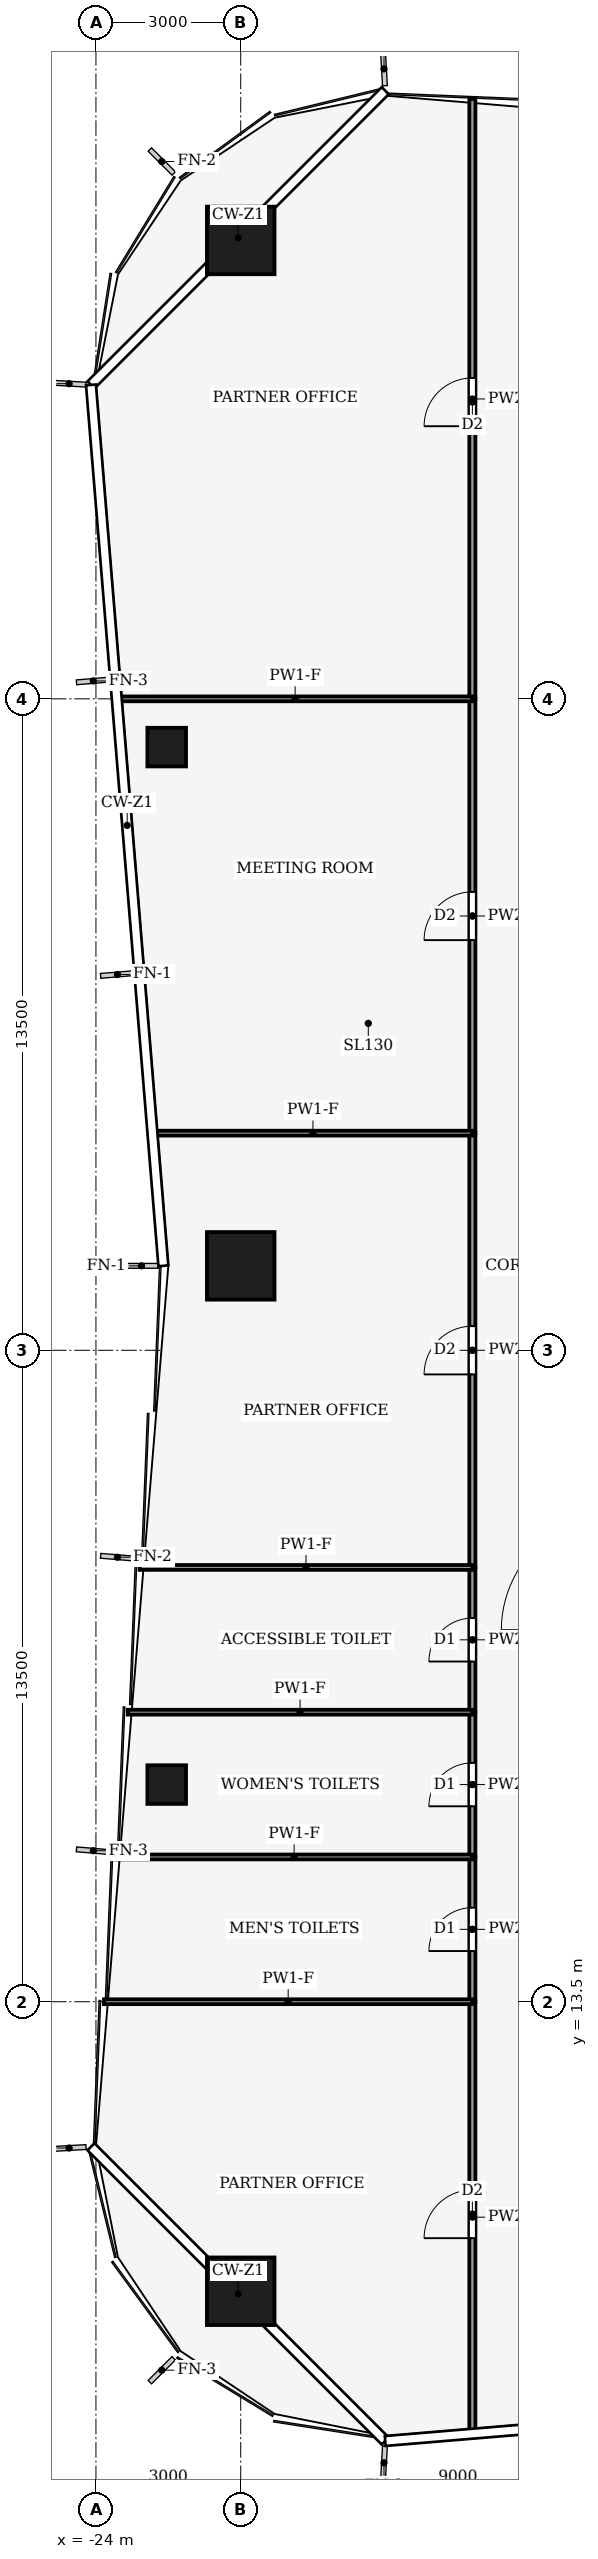
"""IFC4 building model, lengths in metres.
Left out: names, types, materials, properties, quantities, classifications, styles, units other than length and angle.
Written with IfcOpenShell. Run it as: python <this file> out.ifc"""

import sys

from ifc_helpers import new_model, si_unit, direction, frame, frame_2d, origin, origin_2d, place, context, subcontext, project, spatial, rectangle, hollow_rectangle, extrude, element, fill, save


model = new_model("IFC4")
c1 = context("Model", 3, precision=1e-05, world=origin(), true_north=direction((0.0, 1.0)))
c2 = subcontext(c1, "Body", "Model", "MODEL_VIEW")
j1 = project(units=[si_unit("LENGTHUNIT", "METRE"), si_unit("PLANEANGLEUNIT", "RADIAN")], contexts=[c1])
p1 = place(None, origin())
s1 = spatial("IfcSite", under=j1, at=p1, CompositionType="ELEMENT")
p2 = place(p1, origin())
s2 = spatial("IfcBuilding", under=s1, at=p2, CompositionType="ELEMENT")
p3 = place(p2, frame((0.0, 0.0, 106.0)))
s3 = spatial("IfcBuildingStorey", under=s2, at=p3, CompositionType="ELEMENT", Elevation=106.0)
for number, where, z_axis, x_axis in (
    (1, (-21.0, 50.0, 0.0), (0.0, 0.0, 1.0), (1.0, 0.0, 0.0)),
    (2, (-21.0, 7.5, 0.0), (0.0, 0.0, 1.0), (1.0, 0.0, 0.0)),
    (3, (-21.0, 28.75, 0.0), (0.0, 0.0, 1.0), (1.0, 0.0, 0.0)),
):
    element("IfcColumn", number, at=place(p3, frame(where, z_axis=z_axis, x_axis=x_axis)), inside=s3, PredefinedType="COLUMN", context=c2, shape_type="SweptSolid", body=[
        extrude(hollow_rectangle(XDim=1.4, YDim=1.4, WallThickness=0.08, at=origin_2d()), origin(), (0.0, 0.0, 1.0), 4.0),
    ])
for number, where, z_axis, x_axis in (
    (4, (-22.534, 18.0, 0.0), (0.0, 0.0, 1.0), (1.0, 0.0, 0.0)),
    (5, (-22.534, 39.5, 0.0), (0.0, 0.0, 1.0), (1.0, 0.0, 0.0)),
):
    element("IfcColumn", number, at=place(p3, frame(where, z_axis=z_axis, x_axis=x_axis)), inside=s3, PredefinedType="COLUMN", context=c2, shape_type="SweptSolid", body=[
        extrude(hollow_rectangle(XDim=0.8, YDim=0.8, WallThickness=0.04, at=origin_2d()), origin(), (0.0, 0.0, 1.0), 4.0),
    ])
p4 = place(p3, frame((-16.2, 4.57, 0.0), z_axis=(0.0, 0.0, 1.0), x_axis=(0.0, 1.0, 0.0)))
e6 = element("IfcWall", 6, at=p4, inside=s3, PredefinedType="PARTITIONING", context=c2, shape_type="SweptSolid", body=[
    extrude(rectangle(XDim=8.93, YDim=0.125, at=frame_2d((4.465, 0.0))), origin(), (0.0, 0.0, 1.0), 3.04),
])
p5 = place(p4, frame((4.03, 0.0, 0.0)))
e7 = element("IfcOpeningElement", 7, at=p5, cuts=e6, PredefinedType="OPENING", context=c2, shape_type="SweptSolid", body=[
    extrude(rectangle(XDim=1.0, YDim=2.1, at=frame_2d((0.5, 1.05))), frame((0.0, 0.073, 0.0), z_axis=(0.0, -1.0, 0.0), x_axis=(1.0, 0.0, 0.0)), (0.0, 0.0, 1.0), 0.145),
])
p6 = place(p3, frame((-16.2, 13.5, 0.0), z_axis=(0.0, 0.0, 1.0), x_axis=(0.0, 1.0, 0.0)))
e8 = element("IfcWall", 8, at=p6, inside=s3, PredefinedType="PARTITIONING", context=c2, shape_type="SweptSolid", body=[
    extrude(rectangle(XDim=3.0, YDim=0.125, at=frame_2d((1.5, 0.0))), origin(), (0.0, 0.0, 1.0), 3.87),
])
p7 = place(p6, frame((1.05, 0.0, 0.0)))
e9 = element("IfcOpeningElement", 9, at=p7, cuts=e8, PredefinedType="OPENING", context=c2, shape_type="SweptSolid", body=[
    extrude(rectangle(XDim=0.9, YDim=2.1, at=frame_2d((0.45, 1.05))), frame((0.0, 0.073, 0.0), z_axis=(0.0, -1.0, 0.0), x_axis=(1.0, 0.0, 0.0)), (0.0, 0.0, 1.0), 0.145),
])
p8 = place(p3, frame((-16.2, 16.5, 0.0), z_axis=(0.0, 0.0, 1.0), x_axis=(0.0, 1.0, 0.0)))
e10 = element("IfcWall", 10, at=p8, inside=s3, PredefinedType="PARTITIONING", context=c2, shape_type="SweptSolid", body=[
    extrude(rectangle(XDim=3.0, YDim=0.125, at=frame_2d((1.5, 0.0))), origin(), (0.0, 0.0, 1.0), 3.14),
])
p9 = place(p8, frame((1.05, 0.0, 0.0)))
e11 = element("IfcOpeningElement", 11, at=p9, cuts=e10, PredefinedType="OPENING", context=c2, shape_type="SweptSolid", body=[
    extrude(rectangle(XDim=0.9, YDim=2.1, at=frame_2d((0.45, 1.05))), frame((0.0, 0.073, 0.0), z_axis=(0.0, -1.0, 0.0), x_axis=(1.0, 0.0, 0.0)), (0.0, 0.0, 1.0), 0.145),
])
p10 = place(p3, frame((-16.2, 19.5, 0.0), z_axis=(0.0, 0.0, 1.0), x_axis=(0.0, 1.0, 0.0)))
e12 = element("IfcWall", 12, at=p10, inside=s3, PredefinedType="PARTITIONING", context=c2, shape_type="SweptSolid", body=[
    extrude(rectangle(XDim=3.0, YDim=0.125, at=frame_2d((1.5, 0.0))), origin(), (0.0, 0.0, 1.0), 3.87),
])
p11 = place(p10, frame((1.05, 0.0, 0.0)))
e13 = element("IfcOpeningElement", 13, at=p11, cuts=e12, PredefinedType="OPENING", context=c2, shape_type="SweptSolid", body=[
    extrude(rectangle(XDim=0.9, YDim=2.1, at=frame_2d((0.45, 1.05))), frame((0.0, 0.073, 0.0), z_axis=(0.0, -1.0, 0.0), x_axis=(1.0, 0.0, 0.0)), (0.0, 0.0, 1.0), 0.145),
])
p12 = place(p3, frame((-16.2, 22.5, 0.0), z_axis=(0.0, 0.0, 1.0), x_axis=(0.0, 1.0, 0.0)))
e14 = element("IfcWall", 14, at=p12, inside=s3, PredefinedType="PARTITIONING", context=c2, shape_type="SweptSolid", body=[
    extrude(rectangle(XDim=9.0, YDim=0.125, at=frame_2d((4.5, 0.0))), origin(), (0.0, 0.0, 1.0), 3.48),
])
p13 = place(p12, frame((4.0, 0.0, 0.0)))
e15 = element("IfcOpeningElement", 15, at=p13, cuts=e14, PredefinedType="OPENING", context=c2, shape_type="SweptSolid", body=[
    extrude(rectangle(XDim=1.0, YDim=2.1, at=frame_2d((0.5, 1.05))), frame((0.0, 0.073, 0.0), z_axis=(0.0, -1.0, 0.0), x_axis=(1.0, 0.0, 0.0)), (0.0, 0.0, 1.0), 0.145),
])
p14 = place(p3, frame((-16.2, 31.5, 0.0), z_axis=(0.0, 0.0, 1.0), x_axis=(0.0, 1.0, 0.0)))
e16 = element("IfcWall", 16, at=p14, inside=s3, PredefinedType="PARTITIONING", context=c2, shape_type="SweptSolid", body=[
    extrude(rectangle(XDim=9.0, YDim=0.125, at=frame_2d((4.5, 0.0))), origin(), (0.0, 0.0, 1.0), 3.14),
])
p15 = place(p14, frame((4.0, 0.0, 0.0)))
e17 = element("IfcOpeningElement", 17, at=p15, cuts=e16, PredefinedType="OPENING", context=c2, shape_type="SweptSolid", body=[
    extrude(rectangle(XDim=1.0, YDim=2.1, at=frame_2d((0.5, 1.05))), frame((0.0, 0.073, 0.0), z_axis=(0.0, -1.0, 0.0), x_axis=(1.0, 0.0, 0.0)), (0.0, 0.0, 1.0), 0.145),
])
p16 = place(p3, frame((-16.2, 40.5, 0.0), z_axis=(0.0, 0.0, 1.0), x_axis=(0.0, 1.0, 0.0)))
e18 = element("IfcWall", 18, at=p16, inside=s3, PredefinedType="PARTITIONING", context=c2, shape_type="SweptSolid", body=[
    extrude(rectangle(XDim=12.43, YDim=0.125, at=frame_2d((6.215, 0.0))), origin(), (0.0, 0.0, 1.0), 3.04),
])
p17 = place(p16, frame((5.65, 0.0, 0.0)))
e19 = element("IfcOpeningElement", 19, at=p17, cuts=e18, PredefinedType="OPENING", context=c2, shape_type="SweptSolid", body=[
    extrude(rectangle(XDim=1.0, YDim=2.1, at=frame_2d((0.5, 1.05))), frame((0.0, 0.073, 0.0), z_axis=(0.0, -1.0, 0.0), x_axis=(1.0, 0.0, 0.0)), (0.0, 0.0, 1.0), 0.145),
])
p18 = place(p3, frame((-16.2, 13.5, 0.0), z_axis=(0.0, 0.0, 1.0), x_axis=(-1.0, 0.0, 0.0)))
e20 = element("IfcWall", 20, at=p18, inside=s3, PredefinedType="PARTITIONING", context=c2, shape_type="SweptSolid", body=[
    extrude(rectangle(XDim=7.634, YDim=0.1, at=frame_2d((3.817, 0.0))), origin(), (0.0, 0.0, 1.0), 3.04),
])
p19 = place(p3, frame((-16.2, 16.5, 0.0), z_axis=(0.0, 0.0, 1.0), x_axis=(-1.0, 0.0, 0.0)))
e21 = element("IfcWall", 21, at=p19, inside=s3, PredefinedType="PARTITIONING", context=c2, shape_type="SweptSolid", body=[
    extrude(rectangle(XDim=7.387, YDim=0.1, at=frame_2d((3.693, 0.0))), origin(), (0.0, 0.0, 1.0), 3.04),
])
p20 = place(p3, frame((-16.2, 19.5, 0.0), z_axis=(0.0, 0.0, 1.0), x_axis=(-1.0, 0.0, 0.0)))
e22 = element("IfcWall", 22, at=p20, inside=s3, PredefinedType="PARTITIONING", context=c2, shape_type="SweptSolid", body=[
    extrude(rectangle(XDim=7.14, YDim=0.1, at=frame_2d((3.57, 0.0))), origin(), (0.0, 0.0, 1.0), 3.04),
])
p21 = place(p3, frame((-16.2, 22.5, 0.0), z_axis=(0.0, 0.0, 1.0), x_axis=(-1.0, 0.0, 0.0)))
e23 = element("IfcWall", 23, at=p21, inside=s3, PredefinedType="PARTITIONING", context=c2, shape_type="SweptSolid", body=[
    extrude(rectangle(XDim=6.894, YDim=0.1, at=frame_2d((3.447, 0.0))), origin(), (0.0, 0.0, 1.0), 3.04),
])
p22 = place(p3, frame((-16.2, 31.5, 0.0), z_axis=(0.0, 0.0, 1.0), x_axis=(-1.0, 0.0, 0.0)))
e24 = element("IfcWall", 24, at=p22, inside=s3, PredefinedType="PARTITIONING", context=c2, shape_type="SweptSolid", body=[
    extrude(rectangle(XDim=6.606, YDim=0.1, at=frame_2d((3.303, 0.0))), origin(), (0.0, 0.0, 1.0), 3.04),
])
p23 = place(p3, frame((-16.2, 40.5, 0.0), z_axis=(0.0, 0.0, 1.0), x_axis=(-1.0, 0.0, 0.0)))
e25 = element("IfcWall", 25, at=p23, inside=s3, PredefinedType="PARTITIONING", context=c2, shape_type="SweptSolid", body=[
    extrude(rectangle(XDim=7.346, YDim=0.1, at=frame_2d((3.673, 0.0))), origin(), (0.0, 0.0, 1.0), 3.04),
])
p24 = place(p5, origin())
e26 = element("IfcDoor", 26, at=p24, inside=s3, OperationType="SINGLE_SWING_RIGHT", PredefinedType="DOOR", context=c2, shape_type="SweptSolid", body=[
    extrude(rectangle(XDim=1.0, YDim=2.1, at=frame_2d((0.5, 1.05))), frame((0.0, 0.025, 0.0), z_axis=(0.0, -1.0, 0.0), x_axis=(1.0, 0.0, 0.0)), (0.0, 0.0, 1.0), 0.05),
])
fill(e7, e26)
p25 = place(p7, origin())
e27 = element("IfcDoor", 27, at=p25, inside=s3, OperationType="SINGLE_SWING_RIGHT", PredefinedType="DOOR", context=c2, shape_type="SweptSolid", body=[
    extrude(rectangle(XDim=0.9, YDim=2.1, at=frame_2d((0.45, 1.05))), frame((0.0, 0.025, 0.0), z_axis=(0.0, -1.0, 0.0), x_axis=(1.0, 0.0, 0.0)), (0.0, 0.0, 1.0), 0.05),
])
fill(e9, e27)
p26 = place(p9, origin())
e28 = element("IfcDoor", 28, at=p26, inside=s3, OperationType="SINGLE_SWING_LEFT", PredefinedType="DOOR", context=c2, shape_type="SweptSolid", body=[
    extrude(rectangle(XDim=0.9, YDim=2.1, at=frame_2d((0.45, 1.05))), frame((0.0, 0.025, 0.0), z_axis=(0.0, -1.0, 0.0), x_axis=(1.0, 0.0, 0.0)), (0.0, 0.0, 1.0), 0.05),
])
fill(e11, e28)
p27 = place(p11, origin())
e29 = element("IfcDoor", 29, at=p27, inside=s3, OperationType="SINGLE_SWING_RIGHT", PredefinedType="DOOR", context=c2, shape_type="SweptSolid", body=[
    extrude(rectangle(XDim=0.9, YDim=2.1, at=frame_2d((0.45, 1.05))), frame((0.0, 0.025, 0.0), z_axis=(0.0, -1.0, 0.0), x_axis=(1.0, 0.0, 0.0)), (0.0, 0.0, 1.0), 0.05),
])
fill(e13, e29)
p28 = place(p13, origin())
e30 = element("IfcDoor", 30, at=p28, inside=s3, OperationType="SINGLE_SWING_LEFT", PredefinedType="DOOR", context=c2, shape_type="SweptSolid", body=[
    extrude(rectangle(XDim=1.0, YDim=2.1, at=frame_2d((0.5, 1.05))), frame((0.0, 0.025, 0.0), z_axis=(0.0, -1.0, 0.0), x_axis=(1.0, 0.0, 0.0)), (0.0, 0.0, 1.0), 0.05),
])
fill(e15, e30)
p29 = place(p15, origin())
e31 = element("IfcDoor", 31, at=p29, inside=s3, OperationType="SINGLE_SWING_RIGHT", PredefinedType="DOOR", context=c2, shape_type="SweptSolid", body=[
    extrude(rectangle(XDim=1.0, YDim=2.1, at=frame_2d((0.5, 1.05))), frame((0.0, 0.025, 0.0), z_axis=(0.0, -1.0, 0.0), x_axis=(1.0, 0.0, 0.0)), (0.0, 0.0, 1.0), 0.05),
])
fill(e17, e31)
p30 = place(p17, origin())
e32 = element("IfcDoor", 32, at=p30, inside=s3, OperationType="SINGLE_SWING_LEFT", PredefinedType="DOOR", context=c2, shape_type="SweptSolid", body=[
    extrude(rectangle(XDim=1.0, YDim=2.1, at=frame_2d((0.5, 1.05))), frame((0.0, 0.025, 0.0), z_axis=(0.0, -1.0, 0.0), x_axis=(1.0, 0.0, 0.0)), (0.0, 0.0, 1.0), 0.05),
])
fill(e19, e32)
save(model, sys.argv[1])
